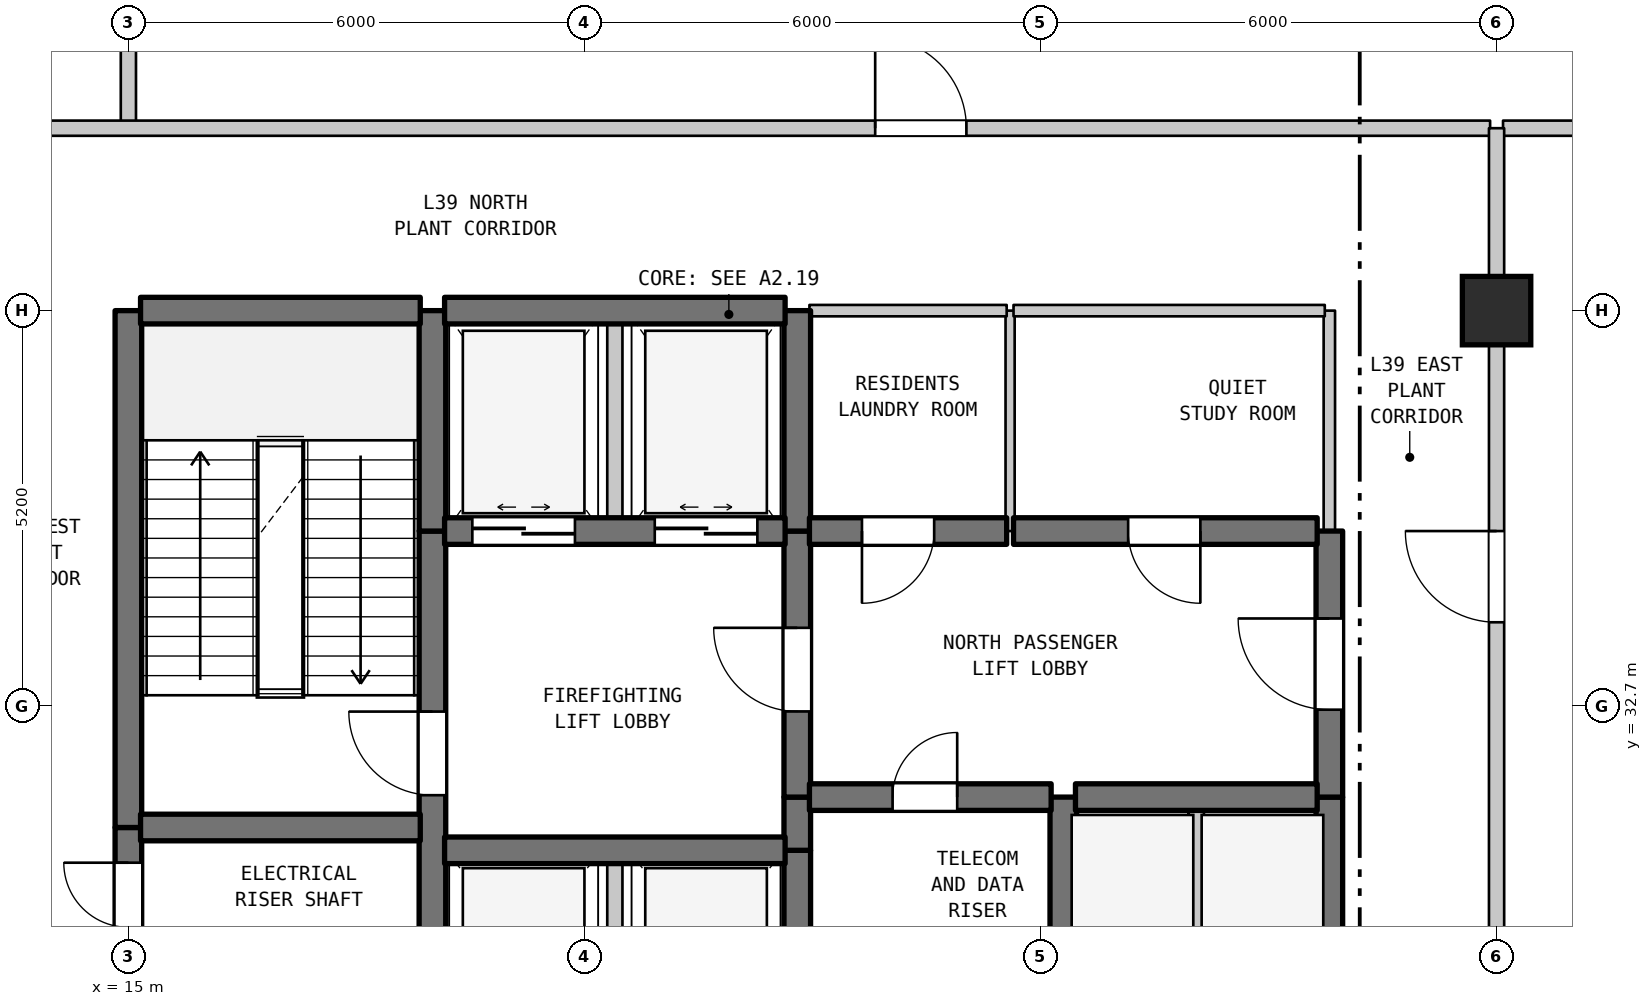
"""IFC4 building model, lengths in metres.
Left out: names, types, materials, properties, quantities, classifications, styles, units other than length and angle.
Written with IfcOpenShell. Run it as: python <this file> out.ifc"""

import sys

from ifc_helpers import new_model, si_unit, direction, frame, frame_2d, origin, origin_2d, place, context, subcontext, project, spatial, rectangle, extrude, element, fill, save


model = new_model("IFC4")
c1 = context("Model", 3, precision=1e-05, world=origin(), true_north=direction((0.0, 1.0)))
c2 = subcontext(c1, "Body", "Model", "MODEL_VIEW")
j1 = project(units=[si_unit("LENGTHUNIT", "METRE"), si_unit("PLANEANGLEUNIT", "RADIAN")], contexts=[c1])
p1 = place(None, origin())
s1 = spatial("IfcSite", under=j1, at=p1, CompositionType="ELEMENT")
p2 = place(p1, origin())
s2 = spatial("IfcBuilding", under=s1, at=p2, CompositionType="ELEMENT")
p3 = place(p2, frame((0.0, 0.0, 159.4)))
s3 = spatial("IfcBuildingStorey", under=s2, at=p3, CompositionType="ELEMENT", Elevation=159.4)
p4 = place(p3, frame((33.0, 37.9, 0.0), z_axis=(0.0, 0.0, 1.0), x_axis=(1.0, 0.0, 0.0)))
e1 = element("IfcColumn", 1, at=p4, inside=s3, PredefinedType="COLUMN", context=c2, shape_type="SweptSolid", body=[
    extrude(rectangle(XDim=0.9, YDim=0.9, at=origin_2d()), origin(), (0.0, 0.0, 1.0), 5.2),
])
p5 = place(p3, frame((3.497, 23.993, 0.0), z_axis=(0.0, 0.0, 1.0), x_axis=(0.358990281293, 0.93334129767, 0.0)))
e2 = element("IfcWall", 2, at=p5, inside=s3, PredefinedType="STANDARD", context=c2, shape_type="SweptSolid", body=[
    extrude(rectangle(XDim=30.669, YDim=0.26, at=frame_2d((15.335, 0.0))), origin(), (0.0, 0.0, 1.0), 4.89),
])
p6 = place(p3, frame((15.0, 29.5, 0.0), z_axis=(0.0, 0.0, 1.0), x_axis=(0.0, 1.0, 0.0)))
e3 = element("IfcWall", 3, at=p6, inside=s3, PredefinedType="SHEAR", context=c2, shape_type="SweptSolid", body=[
    extrude(rectangle(XDim=1.6, YDim=0.35, at=frame_2d((0.8, 0.0))), origin(), (0.0, 0.0, 1.0), 4.89),
])
p7 = place(p6, frame((0.287, 0.0, 0.0)))
e4 = element("IfcOpeningElement", 4, at=p7, cuts=e3, PredefinedType="OPENING", context=c2, shape_type="SweptSolid", body=[
    extrude(rectangle(XDim=0.85, YDim=2.1, at=frame_2d((0.425, 1.05))), frame((0.0, 0.185, 0.0), z_axis=(0.0, -1.0, 0.0), x_axis=(1.0, 0.0, 0.0)), (0.0, 0.0, 1.0), 0.37),
])
p8 = place(p3, frame((15.0, 31.1, 0.0), z_axis=(0.0, 0.0, 1.0), x_axis=(0.0, 1.0, 0.0)))
e5 = element("IfcWall", 5, at=p8, inside=s3, PredefinedType="SHEAR", context=c2, shape_type="SweptSolid", body=[
    extrude(rectangle(XDim=6.8, YDim=0.35, at=frame_2d((3.4, 0.0))), origin(), (0.0, 0.0, 1.0), 4.89),
])
p9 = place(p3, frame((15.0, 40.3, 0.0), z_axis=(0.0, 0.0, 1.0), x_axis=(0.0, 1.0, 0.0)))
e6 = element("IfcWall", 6, at=p9, inside=s3, PredefinedType="STANDARD", context=c2, shape_type="SweptSolid", body=[
    extrude(rectangle(XDim=12.933, YDim=0.2, at=frame_2d((6.466, 0.0))), origin(), (0.0, 0.0, 1.0), 4.89),
])
p10 = place(p3, frame((19.0, 29.5, 0.0), z_axis=(0.0, 0.0, 1.0), x_axis=(0.0, 1.0, 0.0)))
e7 = element("IfcWall", 7, at=p10, inside=s3, PredefinedType="SHEAR", context=c2, shape_type="SweptSolid", body=[
    extrude(rectangle(XDim=5.5, YDim=0.35, at=frame_2d((2.75, 0.0))), origin(), (0.0, 0.0, 1.0), 4.89),
])
p11 = place(p10, frame((2.025, 0.0, 0.0)))
e8 = element("IfcOpeningElement", 8, at=p11, cuts=e7, PredefinedType="OPENING", context=c2, shape_type="SweptSolid", body=[
    extrude(rectangle(XDim=1.1, YDim=2.15, at=frame_2d((0.55, 1.075))), frame((0.0, 0.185, 0.0), z_axis=(0.0, -1.0, 0.0), x_axis=(1.0, 0.0, 0.0)), (0.0, 0.0, 1.0), 0.37),
])
p12 = place(p3, frame((19.0, 35.0, 0.0), z_axis=(0.0, 0.0, 1.0), x_axis=(0.0, 1.0, 0.0)))
e9 = element("IfcWall", 9, at=p12, inside=s3, PredefinedType="SHEAR", context=c2, shape_type="SweptSolid", body=[
    extrude(rectangle(XDim=2.9, YDim=0.35, at=frame_2d((1.45, 0.0))), origin(), (0.0, 0.0, 1.0), 4.89),
])
p13 = place(p3, frame((21.4, 28.2, 0.0), z_axis=(0.0, 0.0, 1.0), x_axis=(0.0, 1.0, 0.0)))
e10 = element("IfcWall", 10, at=p13, inside=s3, PredefinedType="STANDARD", context=c2, shape_type="SweptSolid", body=[
    extrude(rectangle(XDim=2.6, YDim=0.2, at=frame_2d((1.3, 0.0))), origin(), (0.0, 0.0, 1.0), 4.89),
])
p14 = place(p3, frame((21.4, 35.0, 0.0), z_axis=(0.0, 0.0, 1.0), x_axis=(0.0, 1.0, 0.0)))
e11 = element("IfcWall", 11, at=p14, inside=s3, PredefinedType="STANDARD", context=c2, shape_type="SweptSolid", body=[
    extrude(rectangle(XDim=2.9, YDim=0.2, at=frame_2d((1.45, 0.0))), origin(), (0.0, 0.0, 1.0), 4.89),
])
p15 = place(p3, frame((23.8, 29.5, 0.0), z_axis=(0.0, 0.0, 1.0), x_axis=(0.0, 1.0, 0.0)))
e12 = element("IfcWall", 12, at=p15, inside=s3, PredefinedType="SHEAR", context=c2, shape_type="SweptSolid", body=[
    extrude(rectangle(XDim=1.3, YDim=0.35, at=frame_2d((0.65, 0.0))), origin(), (0.0, 0.0, 1.0), 4.89),
])
p16 = place(p3, frame((23.8, 30.8, 0.0), z_axis=(0.0, 0.0, 1.0), x_axis=(0.0, 1.0, 0.0)))
e13 = element("IfcWall", 13, at=p16, inside=s3, PredefinedType="SHEAR", context=c2, shape_type="SweptSolid", body=[
    extrude(rectangle(XDim=0.7, YDim=0.35, at=frame_2d((0.35, 0.0))), origin(), (0.0, 0.0, 1.0), 4.89),
])
p17 = place(p3, frame((23.8, 31.5, 0.0), z_axis=(0.0, 0.0, 1.0), x_axis=(0.0, 1.0, 0.0)))
e14 = element("IfcWall", 14, at=p17, inside=s3, PredefinedType="SHEAR", context=c2, shape_type="SweptSolid", body=[
    extrude(rectangle(XDim=3.5, YDim=0.35, at=frame_2d((1.75, 0.0))), origin(), (0.0, 0.0, 1.0), 4.89),
])
p18 = place(p17, frame((1.127, 0.0, 0.0)))
e15 = element("IfcOpeningElement", 15, at=p18, cuts=e14, PredefinedType="OPENING", context=c2, shape_type="SweptSolid", body=[
    extrude(rectangle(XDim=1.1, YDim=2.15, at=frame_2d((0.55, 1.075))), frame((0.0, 0.185, 0.0), z_axis=(0.0, -1.0, 0.0), x_axis=(1.0, 0.0, 0.0)), (0.0, 0.0, 1.0), 0.37),
])
p19 = place(p3, frame((23.8, 35.0, 0.0), z_axis=(0.0, 0.0, 1.0), x_axis=(0.0, 1.0, 0.0)))
e16 = element("IfcWall", 16, at=p19, inside=s3, PredefinedType="SHEAR", context=c2, shape_type="SweptSolid", body=[
    extrude(rectangle(XDim=2.9, YDim=0.35, at=frame_2d((1.45, 0.0))), origin(), (0.0, 0.0, 1.0), 4.89),
])
p20 = place(p3, frame((26.6, 35.0, 0.0), z_axis=(0.0, 0.0, 1.0), x_axis=(0.0, 1.0, 0.0)))
e17 = element("IfcWall", 17, at=p20, inside=s3, PredefinedType="PARTITIONING", context=c2, shape_type="SweptSolid", body=[
    extrude(rectangle(XDim=2.9, YDim=0.12, at=frame_2d((1.45, 0.0))), origin(), (0.0, 0.0, 1.0), 4.89),
])
p21 = place(p3, frame((27.3, 29.5, 0.0), z_axis=(0.0, 0.0, 1.0), x_axis=(0.0, 1.0, 0.0)))
e18 = element("IfcWall", 18, at=p21, inside=s3, PredefinedType="SHEAR", context=c2, shape_type="SweptSolid", body=[
    extrude(rectangle(XDim=2.0, YDim=0.35, at=frame_2d((1.0, 0.0))), origin(), (0.0, 0.0, 1.0), 4.89),
])
p22 = place(p3, frame((29.05, 28.9, 0.0), z_axis=(0.0, 0.0, 1.0), x_axis=(0.0, 1.0, 0.0)))
e19 = element("IfcWall", 19, at=p22, inside=s3, PredefinedType="STANDARD", context=c2, shape_type="SweptSolid", body=[
    extrude(rectangle(XDim=2.6, YDim=0.2, at=frame_2d((1.3, 0.0))), origin(), (0.0, 0.0, 1.0), 4.89),
])
p23 = place(p3, frame((30.8, 28.9, 0.0), z_axis=(0.0, 0.0, 1.0), x_axis=(0.0, 1.0, 0.0)))
e20 = element("IfcWall", 20, at=p23, inside=s3, PredefinedType="SHEAR", context=c2, shape_type="SweptSolid", body=[
    extrude(rectangle(XDim=2.6, YDim=0.35, at=frame_2d((1.3, 0.0))), origin(), (0.0, 0.0, 1.0), 4.89),
])
p24 = place(p3, frame((30.8, 31.5, 0.0), z_axis=(0.0, 0.0, 1.0), x_axis=(0.0, 1.0, 0.0)))
e21 = element("IfcWall", 21, at=p24, inside=s3, PredefinedType="SHEAR", context=c2, shape_type="SweptSolid", body=[
    extrude(rectangle(XDim=3.5, YDim=0.35, at=frame_2d((1.75, 0.0))), origin(), (0.0, 0.0, 1.0), 4.89),
])
p25 = place(p24, frame((1.15, 0.0, 0.0)))
e22 = element("IfcOpeningElement", 22, at=p25, cuts=e21, PredefinedType="OPENING", context=c2, shape_type="SweptSolid", body=[
    extrude(rectangle(XDim=1.2, YDim=2.2, at=frame_2d((0.6, 1.1))), frame((0.0, 0.185, 0.0), z_axis=(0.0, -1.0, 0.0), x_axis=(1.0, 0.0, 0.0)), (0.0, 0.0, 1.0), 0.37),
])
p26 = place(p3, frame((30.8, 35.0, 0.0), z_axis=(0.0, 0.0, 1.0), x_axis=(0.0, 1.0, 0.0)))
e23 = element("IfcWall", 23, at=p26, inside=s3, PredefinedType="STANDARD", context=c2, shape_type="SweptSolid", body=[
    extrude(rectangle(XDim=2.9, YDim=0.15, at=frame_2d((1.45, 0.0))), origin(), (0.0, 0.0, 1.0), 4.89),
])
p27 = place(p3, frame((33.0, 28.5, 0.0), z_axis=(0.0, 0.0, 1.0), x_axis=(0.0, 1.0, 0.0)))
e24 = element("IfcWall", 24, at=p27, inside=s3, PredefinedType="STANDARD", context=c2, shape_type="SweptSolid", body=[
    extrude(rectangle(XDim=9.4, YDim=0.2, at=frame_2d((4.7, 0.0))), origin(), (0.0, 0.0, 1.0), 4.39),
])
p28 = place(p27, frame((5.3, 0.0, 0.0)))
e25 = element("IfcOpeningElement", 25, at=p28, cuts=e24, PredefinedType="OPENING", context=c2, shape_type="SweptSolid", body=[
    extrude(rectangle(XDim=1.2, YDim=2.2, at=frame_2d((0.6, 1.1))), frame((0.0, 0.11, 0.0), z_axis=(0.0, -1.0, 0.0), x_axis=(1.0, 0.0, 0.0)), (0.0, 0.0, 1.0), 0.22),
])
p29 = place(p3, frame((19.16, 30.8, 0.0), z_axis=(0.0, 0.0, 1.0), x_axis=(1.0, 0.0, 0.0)))
e26 = element("IfcWall", 26, at=p29, inside=s3, PredefinedType="SHEAR", context=c2, shape_type="SweptSolid", body=[
    extrude(rectangle(XDim=4.48, YDim=0.35, at=frame_2d((2.24, 0.0))), origin(), (0.0, 0.0, 1.0), 4.89),
])
p30 = place(p3, frame((15.16, 31.1, 0.0), z_axis=(0.0, 0.0, 1.0), x_axis=(1.0, 0.0, 0.0)))
e27 = element("IfcWall", 27, at=p30, inside=s3, PredefinedType="SHEAR", context=c2, shape_type="SweptSolid", body=[
    extrude(rectangle(XDim=3.68, YDim=0.35, at=frame_2d((1.84, 0.0))), origin(), (0.0, 0.0, 1.0), 4.89),
])
p31 = place(p3, frame((23.96, 31.5, 0.0), z_axis=(0.0, 0.0, 1.0), x_axis=(1.0, 0.0, 0.0)))
e28 = element("IfcWall", 28, at=p31, inside=s3, PredefinedType="SHEAR", context=c2, shape_type="SweptSolid", body=[
    extrude(rectangle(XDim=3.18, YDim=0.35, at=frame_2d((1.59, 0.0))), origin(), (0.0, 0.0, 1.0), 4.89),
])
p32 = place(p31, frame((1.094, 0.0, 0.0)))
e29 = element("IfcOpeningElement", 29, at=p32, cuts=e28, PredefinedType="OPENING", context=c2, shape_type="SweptSolid", body=[
    extrude(rectangle(XDim=0.85, YDim=2.1, at=frame_2d((0.425, 1.05))), frame((0.0, 0.185, 0.0), z_axis=(0.0, -1.0, 0.0), x_axis=(1.0, 0.0, 0.0)), (0.0, 0.0, 1.0), 0.37),
])
p33 = place(p3, frame((27.46, 31.5, 0.0), z_axis=(0.0, 0.0, 1.0), x_axis=(1.0, 0.0, 0.0)))
e30 = element("IfcWall", 30, at=p33, inside=s3, PredefinedType="SHEAR", context=c2, shape_type="SweptSolid", body=[
    extrude(rectangle(XDim=3.18, YDim=0.35, at=frame_2d((1.59, 0.0))), origin(), (0.0, 0.0, 1.0), 4.89),
])
p34 = place(p3, frame((19.16, 35.0, 0.0), z_axis=(0.0, 0.0, 1.0), x_axis=(1.0, 0.0, 0.0)))
e31 = element("IfcWall", 31, at=p34, inside=s3, PredefinedType="SHEAR", context=c2, shape_type="SweptSolid", body=[
    extrude(rectangle(XDim=4.48, YDim=0.35, at=frame_2d((2.24, 0.0))), origin(), (0.0, 0.0, 1.0), 4.89),
])
p35 = place(p34, frame((0.365, 0.0, 0.0)))
e32 = element("IfcOpeningElement", 32, at=p35, cuts=e31, PredefinedType="OPENING", context=c2, shape_type="SweptSolid", body=[
    extrude(rectangle(XDim=1.35, YDim=2.2, at=frame_2d((0.675, 1.1))), frame((0.0, 0.185, 0.0), z_axis=(0.0, -1.0, 0.0), x_axis=(1.0, 0.0, 0.0)), (0.0, 0.0, 1.0), 0.37),
])
p36 = place(p34, frame((2.765, 0.0, 0.0)))
e33 = element("IfcOpeningElement", 33, at=p36, cuts=e31, PredefinedType="OPENING", context=c2, shape_type="SweptSolid", body=[
    extrude(rectangle(XDim=1.35, YDim=2.2, at=frame_2d((0.675, 1.1))), frame((0.0, 0.185, 0.0), z_axis=(0.0, -1.0, 0.0), x_axis=(1.0, 0.0, 0.0)), (0.0, 0.0, 1.0), 0.37),
])
p37 = place(p3, frame((23.96, 35.0, 0.0), z_axis=(0.0, 0.0, 1.0), x_axis=(1.0, 0.0, 0.0)))
e34 = element("IfcWall", 34, at=p37, inside=s3, PredefinedType="SHEAR", context=c2, shape_type="SweptSolid", body=[
    extrude(rectangle(XDim=2.595, YDim=0.35, at=frame_2d((1.297, 0.0))), origin(), (0.0, 0.0, 1.0), 4.89),
])
p38 = place(p37, frame((0.691, 0.0, 0.0)))
e35 = element("IfcOpeningElement", 35, at=p38, cuts=e34, PredefinedType="OPENING", context=c2, shape_type="SweptSolid", body=[
    extrude(rectangle(XDim=0.95, YDim=2.15, at=frame_2d((0.475, 1.075))), frame((0.0, 0.185, 0.0), z_axis=(0.0, -1.0, 0.0), x_axis=(1.0, 0.0, 0.0)), (0.0, 0.0, 1.0), 0.37),
])
p39 = place(p3, frame((26.645, 35.0, 0.0), z_axis=(0.0, 0.0, 1.0), x_axis=(1.0, 0.0, 0.0)))
e36 = element("IfcWall", 36, at=p39, inside=s3, PredefinedType="SHEAR", context=c2, shape_type="SweptSolid", body=[
    extrude(rectangle(XDim=3.995, YDim=0.35, at=frame_2d((1.998, 0.0))), origin(), (0.0, 0.0, 1.0), 4.89),
])
p40 = place(p39, frame((1.508, 0.0, 0.0)))
e37 = element("IfcOpeningElement", 37, at=p40, cuts=e36, PredefinedType="OPENING", context=c2, shape_type="SweptSolid", body=[
    extrude(rectangle(XDim=0.95, YDim=2.15, at=frame_2d((0.475, 1.075))), frame((0.0, 0.185, 0.0), z_axis=(0.0, -1.0, 0.0), x_axis=(1.0, 0.0, 0.0)), (0.0, 0.0, 1.0), 0.37),
])
p41 = place(p3, frame((15.16, 37.9, 0.0), z_axis=(0.0, 0.0, 1.0), x_axis=(1.0, 0.0, 0.0)))
e38 = element("IfcWall", 38, at=p41, inside=s3, PredefinedType="SHEAR", context=c2, shape_type="SweptSolid", body=[
    extrude(rectangle(XDim=3.68, YDim=0.35, at=frame_2d((1.84, 0.0))), origin(), (0.0, 0.0, 1.0), 4.89),
])
p42 = place(p3, frame((19.16, 37.9, 0.0), z_axis=(0.0, 0.0, 1.0), x_axis=(1.0, 0.0, 0.0)))
e39 = element("IfcWall", 39, at=p42, inside=s3, PredefinedType="SHEAR", context=c2, shape_type="SweptSolid", body=[
    extrude(rectangle(XDim=4.48, YDim=0.35, at=frame_2d((2.24, 0.0))), origin(), (0.0, 0.0, 1.0), 4.89),
])
p43 = place(p3, frame((23.96, 37.9, 0.0), z_axis=(0.0, 0.0, 1.0), x_axis=(1.0, 0.0, 0.0)))
e40 = element("IfcWall", 40, at=p43, inside=s3, PredefinedType="STANDARD", context=c2, shape_type="SweptSolid", body=[
    extrude(rectangle(XDim=2.595, YDim=0.15, at=frame_2d((1.297, 0.0))), origin(), (0.0, 0.0, 1.0), 4.39),
])
p44 = place(p3, frame((26.645, 37.9, 0.0), z_axis=(0.0, 0.0, 1.0), x_axis=(1.0, 0.0, 0.0)))
e41 = element("IfcWall", 41, at=p44, inside=s3, PredefinedType="STANDARD", context=c2, shape_type="SweptSolid", body=[
    extrude(rectangle(XDim=4.095, YDim=0.15, at=frame_2d((2.047, 0.0))), origin(), (0.0, 0.0, 1.0), 4.39),
])
p45 = place(p3, frame((12.685, 40.3, 0.0), z_axis=(0.0, 0.0, 1.0), x_axis=(1.0, 0.0, 0.0)))
e42 = element("IfcWall", 42, at=p45, inside=s3, PredefinedType="STANDARD", context=c2, shape_type="SweptSolid", body=[
    extrude(rectangle(XDim=20.23, YDim=0.2, at=frame_2d((10.115, 0.0))), origin(), (0.0, 0.0, 1.0), 4.89),
])
p46 = place(p45, frame((12.14, 0.0, 0.0)))
e43 = element("IfcOpeningElement", 43, at=p46, cuts=e42, PredefinedType="OPENING", context=c2, shape_type="SweptSolid", body=[
    extrude(rectangle(XDim=1.2, YDim=2.2, at=frame_2d((0.6, 1.1))), frame((0.0, 0.11, 0.0), z_axis=(0.0, -1.0, 0.0), x_axis=(1.0, 0.0, 0.0)), (0.0, 0.0, 1.0), 0.22),
])
p47 = place(p3, frame((33.085, 40.3, 0.0), z_axis=(0.0, 0.0, 1.0), x_axis=(1.0, 0.0, 0.0)))
e44 = element("IfcWall", 44, at=p47, inside=s3, PredefinedType="STANDARD", context=c2, shape_type="SweptSolid", body=[
    extrude(rectangle(XDim=28.105, YDim=0.2, at=frame_2d((14.052, 0.0))), origin(), (0.0, 0.0, 1.0), 4.89),
])
p48 = place(p3, frame((33.0, 37.9, 0.0), z_axis=(0.0, 0.0, 1.0), x_axis=(0.0, 1.0, 0.0)))
e45 = element("IfcWall", 45, at=p48, inside=s3, PredefinedType="STANDARD", context=c2, shape_type="SweptSolid", body=[
    extrude(rectangle(XDim=2.4, YDim=0.2, at=frame_2d((1.2, 0.0))), origin(), (0.0, 0.0, 1.0), 4.29),
])
p49 = place(p7, origin())
e46 = element("IfcDoor", 46, at=p49, inside=s3, OperationType="SINGLE_SWING_RIGHT", PredefinedType="DOOR", context=c2, shape_type="SweptSolid", body=[
    extrude(rectangle(XDim=0.85, YDim=2.1, at=frame_2d((0.425, 1.05))), frame((0.0, 0.025, 0.0), z_axis=(0.0, -1.0, 0.0), x_axis=(1.0, 0.0, 0.0)), (0.0, 0.0, 1.0), 0.05),
])
fill(e4, e46)
p50 = place(p11, origin())
e47 = element("IfcDoor", 47, at=p50, inside=s3, OperationType="SINGLE_SWING_RIGHT", PredefinedType="DOOR", context=c2, shape_type="SweptSolid", body=[
    extrude(rectangle(XDim=1.1, YDim=2.15, at=frame_2d((0.55, 1.075))), frame((0.0, 0.025, 0.0), z_axis=(0.0, -1.0, 0.0), x_axis=(1.0, 0.0, 0.0)), (0.0, 0.0, 1.0), 0.05),
])
fill(e8, e47)
p51 = place(p18, origin())
e48 = element("IfcDoor", 48, at=p51, inside=s3, OperationType="SINGLE_SWING_RIGHT", PredefinedType="DOOR", context=c2, shape_type="SweptSolid", body=[
    extrude(rectangle(XDim=1.1, YDim=2.15, at=frame_2d((0.55, 1.075))), frame((0.0, 0.025, 0.0), z_axis=(0.0, -1.0, 0.0), x_axis=(1.0, 0.0, 0.0)), (0.0, 0.0, 1.0), 0.05),
])
fill(e15, e48)
p52 = place(p25, origin())
e49 = element("IfcDoor", 49, at=p52, inside=s3, OperationType="SINGLE_SWING_RIGHT", PredefinedType="DOOR", context=c2, shape_type="SweptSolid", body=[
    extrude(rectangle(XDim=1.2, YDim=2.2, at=frame_2d((0.6, 1.1))), frame((0.0, 0.025, 0.0), z_axis=(0.0, -1.0, 0.0), x_axis=(1.0, 0.0, 0.0)), (0.0, 0.0, 1.0), 0.05),
])
fill(e22, e49)
p53 = place(p28, origin())
e50 = element("IfcDoor", 50, at=p53, inside=s3, OperationType="SINGLE_SWING_RIGHT", PredefinedType="DOOR", context=c2, shape_type="SweptSolid", body=[
    extrude(rectangle(XDim=1.2, YDim=2.2, at=frame_2d((0.6, 1.1))), frame((0.0, 0.025, 0.0), z_axis=(0.0, -1.0, 0.0), x_axis=(1.0, 0.0, 0.0)), (0.0, 0.0, 1.0), 0.05),
])
fill(e25, e50)
p54 = place(p32, origin())
e51 = element("IfcDoor", 51, at=p54, inside=s3, OperationType="SINGLE_SWING_RIGHT", PredefinedType="DOOR", context=c2, shape_type="SweptSolid", body=[
    extrude(rectangle(XDim=0.85, YDim=2.1, at=frame_2d((0.425, 1.05))), frame((0.0, 0.025, 0.0), z_axis=(0.0, -1.0, 0.0), x_axis=(1.0, 0.0, 0.0)), (0.0, 0.0, 1.0), 0.05),
])
fill(e29, e51)
p55 = place(p35, origin())
e52 = element("IfcDoor", 52, at=p55, inside=s3, OperationType="DOUBLE_DOOR_SLIDING", PredefinedType="DOOR", context=c2, shape_type="SweptSolid", body=[
    extrude(rectangle(XDim=1.35, YDim=2.2, at=frame_2d((0.675, 1.1))), frame((0.0, 0.025, 0.0), z_axis=(0.0, -1.0, 0.0), x_axis=(1.0, 0.0, 0.0)), (0.0, 0.0, 1.0), 0.05),
])
fill(e32, e52)
p56 = place(p36, origin())
e53 = element("IfcDoor", 53, at=p56, inside=s3, OperationType="DOUBLE_DOOR_SLIDING", PredefinedType="DOOR", context=c2, shape_type="SweptSolid", body=[
    extrude(rectangle(XDim=1.35, YDim=2.2, at=frame_2d((0.675, 1.1))), frame((0.0, 0.025, 0.0), z_axis=(0.0, -1.0, 0.0), x_axis=(1.0, 0.0, 0.0)), (0.0, 0.0, 1.0), 0.05),
])
fill(e33, e53)
p57 = place(p38, frame((0.95, 0.0, 0.0), z_axis=(0.0, 0.0, 1.0), x_axis=(-1.0, 0.0, 0.0)))
e54 = element("IfcDoor", 54, at=p57, inside=s3, OperationType="SINGLE_SWING_LEFT", PredefinedType="DOOR", context=c2, shape_type="SweptSolid", body=[
    extrude(rectangle(XDim=0.95, YDim=2.15, at=frame_2d((0.475, 1.075))), frame((0.0, 0.025, 0.0), z_axis=(0.0, -1.0, 0.0), x_axis=(1.0, 0.0, 0.0)), (0.0, 0.0, 1.0), 0.05),
])
fill(e35, e54)
p58 = place(p40, frame((0.95, 0.0, 0.0), z_axis=(0.0, 0.0, 1.0), x_axis=(-1.0, 0.0, 0.0)))
e55 = element("IfcDoor", 55, at=p58, inside=s3, OperationType="SINGLE_SWING_RIGHT", PredefinedType="DOOR", context=c2, shape_type="SweptSolid", body=[
    extrude(rectangle(XDim=0.95, YDim=2.15, at=frame_2d((0.475, 1.075))), frame((0.0, 0.025, 0.0), z_axis=(0.0, -1.0, 0.0), x_axis=(1.0, 0.0, 0.0)), (0.0, 0.0, 1.0), 0.05),
])
fill(e37, e55)
p59 = place(p46, origin())
e56 = element("IfcDoor", 56, at=p59, inside=s3, OperationType="SINGLE_SWING_LEFT", PredefinedType="DOOR", context=c2, shape_type="SweptSolid", body=[
    extrude(rectangle(XDim=1.2, YDim=2.2, at=frame_2d((0.6, 1.1))), frame((0.0, 0.025, 0.0), z_axis=(0.0, -1.0, 0.0), x_axis=(1.0, 0.0, 0.0)), (0.0, 0.0, 1.0), 0.05),
])
fill(e43, e56)
save(model, sys.argv[1])
